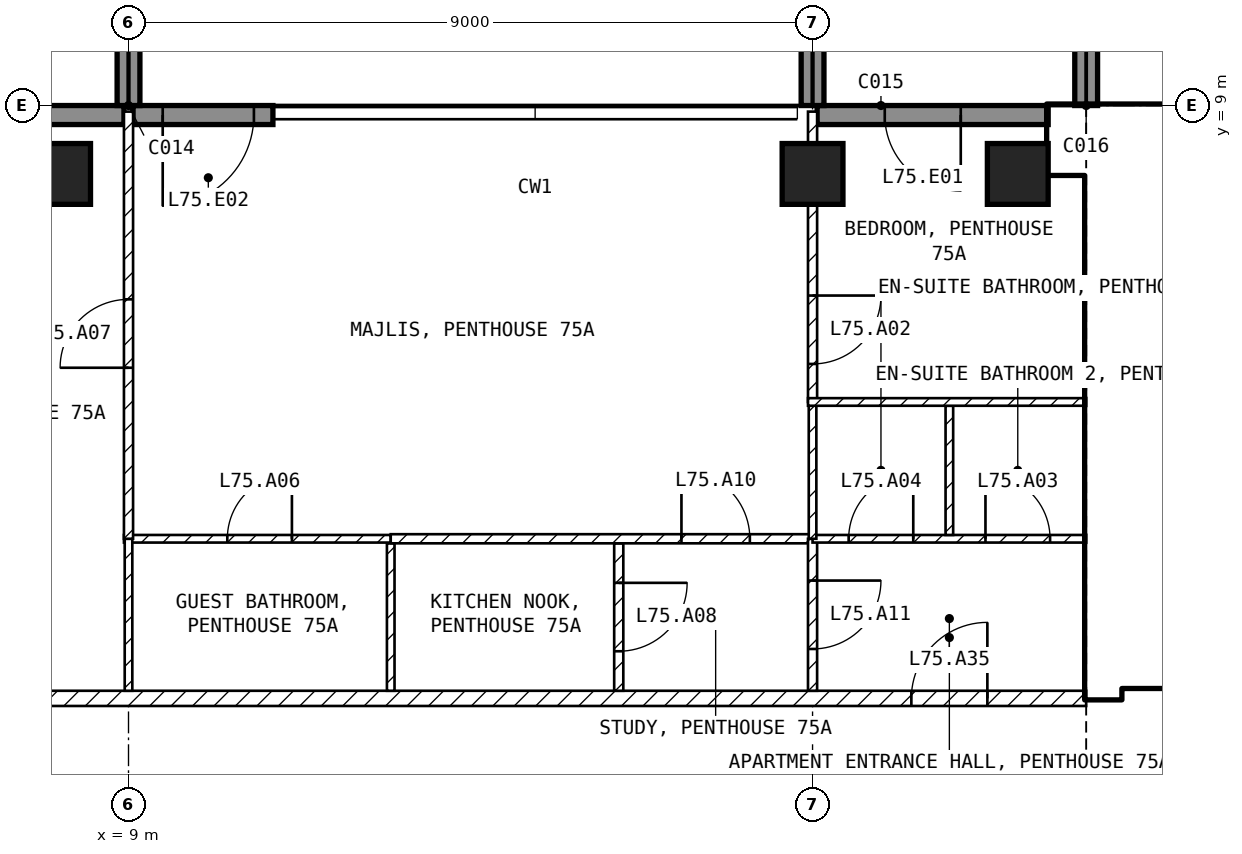
"""IFC4 building model, lengths in metres.
Left out: names, types, materials, properties, quantities, classifications, styles, units other than length and angle.
Written with IfcOpenShell. Run it as: python <this file> out.ifc"""

import sys

from ifc_helpers import new_model, si_unit, direction, frame, frame_2d, origin, origin_2d, place, context, subcontext, project, spatial, rectangle, extrude, element, fill, save


model = new_model("IFC4")
c1 = context("Model", 3, precision=1e-05, world=origin(), true_north=direction((0.0, 1.0)))
c2 = subcontext(c1, "Body", "Model", "MODEL_VIEW")
j1 = project(units=[si_unit("LENGTHUNIT", "METRE"), si_unit("PLANEANGLEUNIT", "RADIAN")], contexts=[c1])
p1 = place(None, origin())
s1 = spatial("IfcSite", under=j1, at=p1, CompositionType="ELEMENT")
p2 = place(p1, origin())
s2 = spatial("IfcBuilding", under=s1, at=p2, CompositionType="ELEMENT")
p3 = place(p2, frame((0.0, 0.0, 294.6)))
s3 = spatial("IfcBuildingStorey", under=s2, at=p3, CompositionType="ELEMENT", Elevation=294.6)
for number, where, z_axis, x_axis in (
    (1, (8.1, 8.1, -0.25), (0.0, 0.0, 1.0), (1.0, 0.0, 0.0)),
    (2, (18.0, 8.1, -0.25), (0.0, 0.0, 1.0), (1.0, 0.0, 0.0)),
    (3, (20.7, 8.1, -0.25), (0.0, 0.0, 1.0), (1.0, 0.0, 0.0)),
):
    element("IfcColumn", number, at=place(p3, frame(where, z_axis=z_axis, x_axis=x_axis)), inside=s3, PredefinedType="COLUMN", context=c2, shape_type="SweptSolid", body=[
        extrude(rectangle(XDim=0.8, YDim=0.8, at=origin_2d()), origin(), (0.0, 0.0, 1.0), 4.2),
    ])
p4 = place(p3, frame((21.1, 8.875, 0.0), z_axis=(0.0, 0.0, 1.0), x_axis=(-1.0, 0.0, 0.0)))
e4 = element("IfcWall", 4, at=p4, inside=s3, PredefinedType="SOLIDWALL", context=c2, shape_type="SweptSolid", body=[
    extrude(rectangle(XDim=3.04, YDim=0.25, at=frame_2d((1.52, 0.0))), origin(), (0.0, 0.0, 1.0), 3.95),
])
p5 = place(p4, frame((1.15, 0.0, 0.0)))
e5 = element("IfcOpeningElement", 5, at=p5, cuts=e4, PredefinedType="OPENING", context=c2, shape_type="SweptSolid", body=[
    extrude(rectangle(XDim=1.0, YDim=2.4, at=frame_2d((0.5, 1.2))), frame((0.0, 0.135, 0.0), z_axis=(0.0, -1.0, 0.0), x_axis=(1.0, 0.0, 0.0)), (0.0, 0.0, 1.0), 0.27),
])
p6 = place(p3, frame((10.9, 8.875, 0.0), z_axis=(0.0, 0.0, 1.0), x_axis=(-1.0, 0.0, 0.0)))
e6 = element("IfcWall", 6, at=p6, inside=s3, PredefinedType="SOLIDWALL", context=c2, shape_type="SweptSolid", body=[
    extrude(rectangle(XDim=1.84, YDim=0.25, at=frame_2d((0.92, 0.0))), origin(), (0.0, 0.0, 1.0), 3.95),
])
p7 = place(p6, frame((0.25, 0.0, 0.0)))
e7 = element("IfcOpeningElement", 7, at=p7, cuts=e6, PredefinedType="OPENING", context=c2, shape_type="SweptSolid", body=[
    extrude(rectangle(XDim=1.2, YDim=2.4, at=frame_2d((0.6, 1.2))), frame((0.0, 0.135, 0.0), z_axis=(0.0, -1.0, 0.0), x_axis=(1.0, 0.0, 0.0)), (0.0, 0.0, 1.0), 0.27),
])
p8 = place(p3, frame((8.94, 8.875, 0.0), z_axis=(0.0, 0.0, 1.0), x_axis=(-1.0, 0.0, 0.0)))
e8 = element("IfcWall", 8, at=p8, inside=s3, PredefinedType="SOLIDWALL", context=c2, shape_type="SweptSolid", body=[
    extrude(rectangle(XDim=3.04, YDim=0.25, at=frame_2d((1.52, 0.0))), origin(), (0.0, 0.0, 1.0), 3.95),
])
p9 = place(p8, frame((1.59, 0.0, 0.0)))
e9 = element("IfcOpeningElement", 9, at=p9, cuts=e8, PredefinedType="OPENING", context=c2, shape_type="SweptSolid", body=[
    extrude(rectangle(XDim=1.2, YDim=2.4, at=frame_2d((0.6, 1.2))), frame((0.0, 0.135, 0.0), z_axis=(0.0, -1.0, 0.0), x_axis=(1.0, 0.0, 0.0)), (0.0, 0.0, 1.0), 0.27),
])
for number, where, z_axis, x_axis in (
    (10, (9.0, 9.0, 0.0), (0.0, 0.0, 1.0), (0.0, 1.0, 0.0)),
    (11, (18.0, 9.0, 0.0), (0.0, 0.0, 1.0), (0.0, 1.0, 0.0)),
    (12, (21.6, 9.0, 0.0), (0.0, 0.0, 1.0), (0.0, 1.0, 0.0)),
):
    element("IfcWall", number, at=place(p3, frame(where, z_axis=z_axis, x_axis=x_axis)), inside=s3, PredefinedType="SOLIDWALL", context=c2, shape_type="SweptSolid", body=[
        extrude(rectangle(XDim=2.7, YDim=0.3, at=frame_2d((1.35, 0.0))), origin(), (0.0, 0.0, 1.0), 3.95),
    ])
p10 = place(p3, frame((21.1, 8.55, 0.0), z_axis=(0.0, 0.0, 1.0), x_axis=(1.0, 0.0, 0.0)))
e13 = element("IfcWall", 13, at=p10, inside=s3, PredefinedType="SHEAR", context=c2, shape_type="SweptSolid", body=[
    extrude(rectangle(XDim=8.65, YDim=0.9, at=frame_2d((4.325, 0.0))), origin(), (0.0, 0.0, 1.0), 3.95),
])
p11 = place(p3, frame((21.825, 1.2, 0.0), z_axis=(0.0, 0.0, 1.0), x_axis=(0.0, 1.0, 0.0)))
e14 = element("IfcWall", 14, at=p11, inside=s3, PredefinedType="SHEAR", context=c2, shape_type="SweptSolid", body=[
    extrude(rectangle(XDim=6.9, YDim=0.45, at=frame_2d((3.45, 0.0))), origin(), (0.0, 0.0, 1.0), 3.95),
])
p12 = place(p3, frame((22.05, 1.45, 0.0), z_axis=(0.0, 0.0, 1.0), x_axis=(1.0, 0.0, 0.0)))
e15 = element("IfcWall", 15, at=p12, inside=s3, PredefinedType="SOLIDWALL", context=c2, shape_type="SweptSolid", body=[
    extrude(rectangle(XDim=11.3, YDim=0.2, at=frame_2d((5.65, 0.0))), origin(), (0.0, 0.0, 1.0), 3.95),
])
p13 = place(p12, frame((0.75, 0.0, 0.0)))
e16 = element("IfcOpeningElement", 16, at=p13, cuts=e15, PredefinedType="OPENING", context=c2, shape_type="SweptSolid", body=[
    extrude(rectangle(XDim=1.0, YDim=2.1, at=frame_2d((0.5, 1.05))), frame((0.0, 0.11, 0.0), z_axis=(0.0, -1.0, 0.0), x_axis=(1.0, 0.0, 0.0)), (0.0, 0.0, 1.0), 0.22),
])
p14 = place(p12, frame((3.25, 0.0, 0.0)))
e17 = element("IfcOpeningElement", 17, at=p14, cuts=e15, PredefinedType="OPENING", context=c2, shape_type="SweptSolid", body=[
    extrude(rectangle(XDim=1.0, YDim=2.1, at=frame_2d((0.5, 1.05))), frame((0.0, 0.11, 0.0), z_axis=(0.0, -1.0, 0.0), x_axis=(1.0, 0.0, 0.0)), (0.0, 0.0, 1.0), 0.22),
])
p15 = place(p12, frame((9.225, 0.0, 0.0)))
e18 = element("IfcOpeningElement", 18, at=p15, cuts=e15, PredefinedType="OPENING", context=c2, shape_type="SweptSolid", body=[
    extrude(rectangle(XDim=0.9, YDim=2.1, at=frame_2d((0.45, 1.05))), frame((0.0, 0.11, 0.0), z_axis=(0.0, -1.0, 0.0), x_axis=(1.0, 0.0, 0.0)), (0.0, 0.0, 1.0), 0.22),
])
p16 = place(p3, frame((22.05, 5.15, 0.0), z_axis=(0.0, 0.0, 1.0), x_axis=(1.0, 0.0, 0.0)))
e19 = element("IfcWall", 19, at=p16, inside=s3, PredefinedType="SOLIDWALL", context=c2, shape_type="SweptSolid", body=[
    extrude(rectangle(XDim=6.3, YDim=0.2, at=frame_2d((3.15, 0.0))), origin(), (0.0, 0.0, 1.0), 3.95),
])
p17 = place(p16, frame((0.2, 0.0, 0.0)))
e20 = element("IfcOpeningElement", 20, at=p17, cuts=e19, PredefinedType="OPENING", context=c2, shape_type="SweptSolid", body=[
    extrude(rectangle(XDim=1.0, YDim=2.1, at=frame_2d((0.5, 1.05))), frame((0.0, 0.11, 0.0), z_axis=(0.0, -1.0, 0.0), x_axis=(1.0, 0.0, 0.0)), (0.0, 0.0, 1.0), 0.22),
])
p18 = place(p3, frame((4.4, 1.2, 0.0), z_axis=(0.0, 0.0, 1.0), x_axis=(1.0, 0.0, 0.0)))
e21 = element("IfcWall", 21, at=p18, inside=s3, PredefinedType="PARTITIONING", context=c2, shape_type="SweptSolid", body=[
    extrude(rectangle(XDim=17.2, YDim=0.2, at=frame_2d((8.6, 0.0))), origin(), (0.0, 0.0, 1.0), 3.95),
])
p19 = place(p18, frame((14.9, 0.0, 0.0)))
e22 = element("IfcOpeningElement", 22, at=p19, cuts=e21, PredefinedType="OPENING", context=c2, shape_type="SweptSolid", body=[
    extrude(rectangle(XDim=1.0, YDim=2.1, at=frame_2d((0.5, 1.05))), frame((0.0, 0.11, 0.0), z_axis=(0.0, -1.0, 0.0), x_axis=(1.0, 0.0, 0.0)), (0.0, 0.0, 1.0), 0.22),
])
p20 = place(p3, frame((12.45, 3.24, 0.0), z_axis=(0.0, 0.0, 1.0), x_axis=(0.0, -1.0, 0.0)))
e23 = element("IfcWall", 23, at=p20, inside=s3, PredefinedType="PARTITIONING", context=c2, shape_type="SweptSolid", body=[
    extrude(rectangle(XDim=1.94, YDim=0.1, at=frame_2d((0.97, 0.0))), origin(), (0.0, 0.0, 1.0), 3.95),
])
p21 = place(p3, frame((8.94, 3.3, 0.0), z_axis=(0.0, 0.0, 1.0), x_axis=(1.0, 0.0, 0.0)))
e24 = element("IfcWall", 24, at=p21, inside=s3, PredefinedType="PARTITIONING", context=c2, shape_type="SweptSolid", body=[
    extrude(rectangle(XDim=3.51, YDim=0.1, at=frame_2d((1.755, 0.0))), origin(), (0.0, 0.0, 1.0), 3.95),
])
p22 = place(p21, frame((1.36, 0.0, 0.0)))
e25 = element("IfcOpeningElement", 25, at=p22, cuts=e24, PredefinedType="OPENING", context=c2, shape_type="SweptSolid", body=[
    extrude(rectangle(XDim=0.85, YDim=2.1, at=frame_2d((0.425, 1.05))), frame((0.0, 0.06, 0.0), z_axis=(0.0, -1.0, 0.0), x_axis=(1.0, 0.0, 0.0)), (0.0, 0.0, 1.0), 0.12),
])
p23 = place(p3, frame((9.0, 1.3, 0.0), z_axis=(0.0, 0.0, 1.0), x_axis=(0.0, 1.0, 0.0)))
e26 = element("IfcWall", 26, at=p23, inside=s3, PredefinedType="PARTITIONING", context=c2, shape_type="SweptSolid", body=[
    extrude(rectangle(XDim=2.0, YDim=0.1, at=frame_2d((1.0, 0.0))), origin(), (0.0, 0.0, 1.0), 3.95),
])
p24 = place(p3, frame((15.45, 3.24, 0.0), z_axis=(0.0, 0.0, 1.0), x_axis=(0.0, -1.0, 0.0)))
e27 = element("IfcWall", 27, at=p24, inside=s3, PredefinedType="PARTITIONING", context=c2, shape_type="SweptSolid", body=[
    extrude(rectangle(XDim=1.94, YDim=0.12, at=frame_2d((0.97, 0.0))), origin(), (0.0, 0.0, 1.0), 3.95),
])
p25 = place(p24, frame((0.52, 0.0, 0.0)))
e28 = element("IfcOpeningElement", 28, at=p25, cuts=e27, PredefinedType="OPENING", context=c2, shape_type="SweptSolid", body=[
    extrude(rectangle(XDim=0.9, YDim=2.1, at=frame_2d((0.45, 1.05))), frame((0.0, 0.07, 0.0), z_axis=(0.0, -1.0, 0.0), x_axis=(1.0, 0.0, 0.0)), (0.0, 0.0, 1.0), 0.14),
])
p26 = place(p3, frame((12.45, 3.3, 0.0), z_axis=(0.0, 0.0, 1.0), x_axis=(1.0, 0.0, 0.0)))
e29 = element("IfcWall", 29, at=p26, inside=s3, PredefinedType="PARTITIONING", context=c2, shape_type="SweptSolid", body=[
    extrude(rectangle(XDim=5.55, YDim=0.12, at=frame_2d((2.775, 0.0))), origin(), (0.0, 0.0, 1.0), 3.95),
])
p27 = place(p26, frame((3.825, 0.0, 0.0)))
e30 = element("IfcOpeningElement", 30, at=p27, cuts=e29, PredefinedType="OPENING", context=c2, shape_type="SweptSolid", body=[
    extrude(rectangle(XDim=0.9, YDim=2.1, at=frame_2d((0.45, 1.05))), frame((0.0, 0.07, 0.0), z_axis=(0.0, -1.0, 0.0), x_axis=(1.0, 0.0, 0.0)), (0.0, 0.0, 1.0), 0.14),
])
p28 = place(p3, frame((18.0, 3.3, 0.0), z_axis=(0.0, 0.0, 1.0), x_axis=(0.0, -1.0, 0.0)))
e31 = element("IfcWall", 31, at=p28, inside=s3, PredefinedType="PARTITIONING", context=c2, shape_type="SweptSolid", body=[
    extrude(rectangle(XDim=2.0, YDim=0.12, at=frame_2d((1.0, 0.0))), origin(), (0.0, 0.0, 1.0), 3.196),
])
p29 = place(p28, frame((0.55, 0.0, 0.0)))
e32 = element("IfcOpeningElement", 32, at=p29, cuts=e31, PredefinedType="OPENING", context=c2, shape_type="SweptSolid", body=[
    extrude(rectangle(XDim=0.9, YDim=2.1, at=frame_2d((0.45, 1.05))), frame((0.0, 0.07, 0.0), z_axis=(0.0, -1.0, 0.0), x_axis=(1.0, 0.0, 0.0)), (0.0, 0.0, 1.0), 0.14),
])
p30 = place(p3, frame((18.0, 3.3, 0.0), z_axis=(0.0, 0.0, 1.0), x_axis=(1.0, 0.0, 0.0)))
e33 = element("IfcWall", 33, at=p30, inside=s3, PredefinedType="PARTITIONING", context=c2, shape_type="SweptSolid", body=[
    extrude(rectangle(XDim=3.6, YDim=0.1, at=frame_2d((1.8, 0.0))), origin(), (0.0, 0.0, 1.0), 3.95),
])
p31 = place(p30, frame((2.275, 0.0, 0.0)))
e34 = element("IfcOpeningElement", 34, at=p31, cuts=e33, PredefinedType="OPENING", context=c2, shape_type="SweptSolid", body=[
    extrude(rectangle(XDim=0.85, YDim=2.1, at=frame_2d((0.425, 1.05))), frame((0.0, 0.06, 0.0), z_axis=(0.0, -1.0, 0.0), x_axis=(1.0, 0.0, 0.0)), (0.0, 0.0, 1.0), 0.12),
])
p32 = place(p30, frame((0.475, 0.0, 0.0)))
e35 = element("IfcOpeningElement", 35, at=p32, cuts=e33, PredefinedType="OPENING", context=c2, shape_type="SweptSolid", body=[
    extrude(rectangle(XDim=0.85, YDim=2.1, at=frame_2d((0.425, 1.05))), frame((0.0, 0.06, 0.0), z_axis=(0.0, -1.0, 0.0), x_axis=(1.0, 0.0, 0.0)), (0.0, 0.0, 1.0), 0.12),
])
p33 = place(p3, frame((18.0, 5.1, 0.0), z_axis=(0.0, 0.0, 1.0), x_axis=(0.0, -1.0, 0.0)))
e36 = element("IfcWall", 36, at=p33, inside=s3, PredefinedType="PARTITIONING", context=c2, shape_type="SweptSolid", body=[
    extrude(rectangle(XDim=1.8, YDim=0.1, at=frame_2d((0.9, 0.0))), origin(), (0.0, 0.0, 1.0), 3.196),
])
p34 = place(p3, frame((18.0, 8.92, 0.0), z_axis=(0.0, 0.0, 1.0), x_axis=(0.0, -1.0, 0.0)))
e37 = element("IfcWall", 37, at=p34, inside=s3, PredefinedType="PARTITIONING", context=c2, shape_type="SweptSolid", body=[
    extrude(rectangle(XDim=3.82, YDim=0.12, at=frame_2d((1.91, 0.0))), origin(), (0.0, 0.0, 1.0), 3.196),
])
p35 = place(p34, frame((2.42, 0.0, 0.0)))
e38 = element("IfcOpeningElement", 38, at=p35, cuts=e37, PredefinedType="OPENING", context=c2, shape_type="SweptSolid", body=[
    extrude(rectangle(XDim=0.9, YDim=2.1, at=frame_2d((0.45, 1.05))), frame((0.0, 0.07, 0.0), z_axis=(0.0, -1.0, 0.0), x_axis=(1.0, 0.0, 0.0)), (0.0, 0.0, 1.0), 0.14),
])
p36 = place(p3, frame((9.0, 3.3, 0.0), z_axis=(0.0, 0.0, 1.0), x_axis=(0.0, 1.0, 0.0)))
e39 = element("IfcWall", 39, at=p36, inside=s3, PredefinedType="PARTITIONING", context=c2, shape_type="SweptSolid", body=[
    extrude(rectangle(XDim=5.62, YDim=0.12, at=frame_2d((2.81, 0.0))), origin(), (0.0, 0.0, 1.0), 3.95),
])
p37 = place(p36, frame((2.25, 0.0, 0.0)))
e40 = element("IfcOpeningElement", 40, at=p37, cuts=e39, PredefinedType="OPENING", context=c2, shape_type="SweptSolid", body=[
    extrude(rectangle(XDim=0.9, YDim=2.1, at=frame_2d((0.45, 1.05))), frame((0.0, 0.07, 0.0), z_axis=(0.0, -1.0, 0.0), x_axis=(1.0, 0.0, 0.0)), (0.0, 0.0, 1.0), 0.14),
])
p38 = place(p3, frame((19.8, 5.05, 0.0), z_axis=(0.0, 0.0, 1.0), x_axis=(0.0, -1.0, 0.0)))
e41 = element("IfcWall", 41, at=p38, inside=s3, PredefinedType="PARTITIONING", context=c2, shape_type="SweptSolid", body=[
    extrude(rectangle(XDim=1.7, YDim=0.1, at=frame_2d((0.85, 0.0))), origin(), (0.0, 0.0, 1.0), 3.95),
])
p39 = place(p3, frame((17.94, 5.1, 0.0), z_axis=(0.0, 0.0, 1.0), x_axis=(1.0, 0.0, 0.0)))
e42 = element("IfcWall", 42, at=p39, inside=s3, PredefinedType="PARTITIONING", context=c2, shape_type="SweptSolid", body=[
    extrude(rectangle(XDim=3.66, YDim=0.1, at=frame_2d((1.83, 0.0))), origin(), (0.0, 0.0, 1.0), 3.95),
])
p40 = place(p5, origin())
e43 = element("IfcDoor", 43, at=p40, inside=s3, OperationType="SINGLE_SWING_LEFT", PredefinedType="DOOR", context=c2, shape_type="SweptSolid", body=[
    extrude(rectangle(XDim=1.0, YDim=2.4, at=frame_2d((0.5, 1.2))), frame((0.0, 0.025, 0.0), z_axis=(0.0, -1.0, 0.0), x_axis=(1.0, 0.0, 0.0)), (0.0, 0.0, 1.0), 0.05),
])
fill(e5, e43)
p41 = place(p7, origin())
e44 = element("IfcDoor", 44, at=p41, inside=s3, OperationType="SINGLE_SWING_RIGHT", PredefinedType="DOOR", context=c2, shape_type="SweptSolid", body=[
    extrude(rectangle(XDim=1.2, YDim=2.4, at=frame_2d((0.6, 1.2))), frame((0.0, 0.025, 0.0), z_axis=(0.0, -1.0, 0.0), x_axis=(1.0, 0.0, 0.0)), (0.0, 0.0, 1.0), 0.05),
])
fill(e7, e44)
p42 = place(p17, origin())
e45 = element("IfcDoor", 45, at=p42, inside=s3, OperationType="SINGLE_SWING_LEFT", PredefinedType="DOOR", context=c2, shape_type="SweptSolid", body=[
    extrude(rectangle(XDim=1.0, YDim=2.1, at=frame_2d((0.5, 1.05))), frame((0.0, 0.025, 0.0), z_axis=(0.0, -1.0, 0.0), x_axis=(1.0, 0.0, 0.0)), (0.0, 0.0, 1.0), 0.05),
])
fill(e20, e45)
p43 = place(p35, origin())
e46 = element("IfcDoor", 46, at=p43, inside=s3, OperationType="SINGLE_SWING_LEFT", PredefinedType="DOOR", context=c2, shape_type="SweptSolid", body=[
    extrude(rectangle(XDim=0.9, YDim=2.1, at=frame_2d((0.45, 1.05))), frame((0.0, 0.025, 0.0), z_axis=(0.0, -1.0, 0.0), x_axis=(1.0, 0.0, 0.0)), (0.0, 0.0, 1.0), 0.05),
])
fill(e38, e46)
p44 = place(p31, origin())
e47 = element("IfcDoor", 47, at=p44, inside=s3, OperationType="SINGLE_SWING_LEFT", PredefinedType="DOOR", context=c2, shape_type="SweptSolid", body=[
    extrude(rectangle(XDim=0.85, YDim=2.1, at=frame_2d((0.425, 1.05))), frame((0.0, 0.025, 0.0), z_axis=(0.0, -1.0, 0.0), x_axis=(1.0, 0.0, 0.0)), (0.0, 0.0, 1.0), 0.05),
])
fill(e34, e47)
p45 = place(p32, origin())
e48 = element("IfcDoor", 48, at=p45, inside=s3, OperationType="SINGLE_SWING_RIGHT", PredefinedType="DOOR", context=c2, shape_type="SweptSolid", body=[
    extrude(rectangle(XDim=0.85, YDim=2.1, at=frame_2d((0.425, 1.05))), frame((0.0, 0.025, 0.0), z_axis=(0.0, -1.0, 0.0), x_axis=(1.0, 0.0, 0.0)), (0.0, 0.0, 1.0), 0.05),
])
fill(e35, e48)
p46 = place(p22, origin())
e49 = element("IfcDoor", 49, at=p46, inside=s3, OperationType="SINGLE_SWING_RIGHT", PredefinedType="DOOR", context=c2, shape_type="SweptSolid", body=[
    extrude(rectangle(XDim=0.85, YDim=2.1, at=frame_2d((0.425, 1.05))), frame((0.0, 0.025, 0.0), z_axis=(0.0, -1.0, 0.0), x_axis=(1.0, 0.0, 0.0)), (0.0, 0.0, 1.0), 0.05),
])
fill(e25, e49)
p47 = place(p37, origin())
e50 = element("IfcDoor", 50, at=p47, inside=s3, OperationType="SINGLE_SWING_LEFT", PredefinedType="DOOR", context=c2, shape_type="SweptSolid", body=[
    extrude(rectangle(XDim=0.9, YDim=2.1, at=frame_2d((0.45, 1.05))), frame((0.0, 0.025, 0.0), z_axis=(0.0, -1.0, 0.0), x_axis=(1.0, 0.0, 0.0)), (0.0, 0.0, 1.0), 0.05),
])
fill(e40, e50)
p48 = place(p25, origin())
e51 = element("IfcDoor", 51, at=p48, inside=s3, OperationType="SINGLE_SWING_LEFT", PredefinedType="DOOR", context=c2, shape_type="SweptSolid", body=[
    extrude(rectangle(XDim=0.9, YDim=2.1, at=frame_2d((0.45, 1.05))), frame((0.0, 0.025, 0.0), z_axis=(0.0, -1.0, 0.0), x_axis=(1.0, 0.0, 0.0)), (0.0, 0.0, 1.0), 0.05),
])
fill(e28, e51)
p49 = place(p27, origin())
e52 = element("IfcDoor", 52, at=p49, inside=s3, OperationType="SINGLE_SWING_LEFT", PredefinedType="DOOR", context=c2, shape_type="SweptSolid", body=[
    extrude(rectangle(XDim=0.9, YDim=2.1, at=frame_2d((0.45, 1.05))), frame((0.0, 0.025, 0.0), z_axis=(0.0, -1.0, 0.0), x_axis=(1.0, 0.0, 0.0)), (0.0, 0.0, 1.0), 0.05),
])
fill(e30, e52)
p50 = place(p29, origin())
e53 = element("IfcDoor", 53, at=p50, inside=s3, OperationType="SINGLE_SWING_LEFT", PredefinedType="DOOR", context=c2, shape_type="SweptSolid", body=[
    extrude(rectangle(XDim=0.9, YDim=2.1, at=frame_2d((0.45, 1.05))), frame((0.0, 0.025, 0.0), z_axis=(0.0, -1.0, 0.0), x_axis=(1.0, 0.0, 0.0)), (0.0, 0.0, 1.0), 0.05),
])
fill(e32, e53)
p51 = place(p19, origin())
e54 = element("IfcDoor", 54, at=p51, inside=s3, OperationType="SINGLE_SWING_RIGHT", PredefinedType="DOOR", context=c2, shape_type="SweptSolid", body=[
    extrude(rectangle(XDim=1.0, YDim=2.1, at=frame_2d((0.5, 1.05))), frame((0.0, 0.025, 0.0), z_axis=(0.0, -1.0, 0.0), x_axis=(1.0, 0.0, 0.0)), (0.0, 0.0, 1.0), 0.05),
])
fill(e22, e54)
save(model, sys.argv[1])
